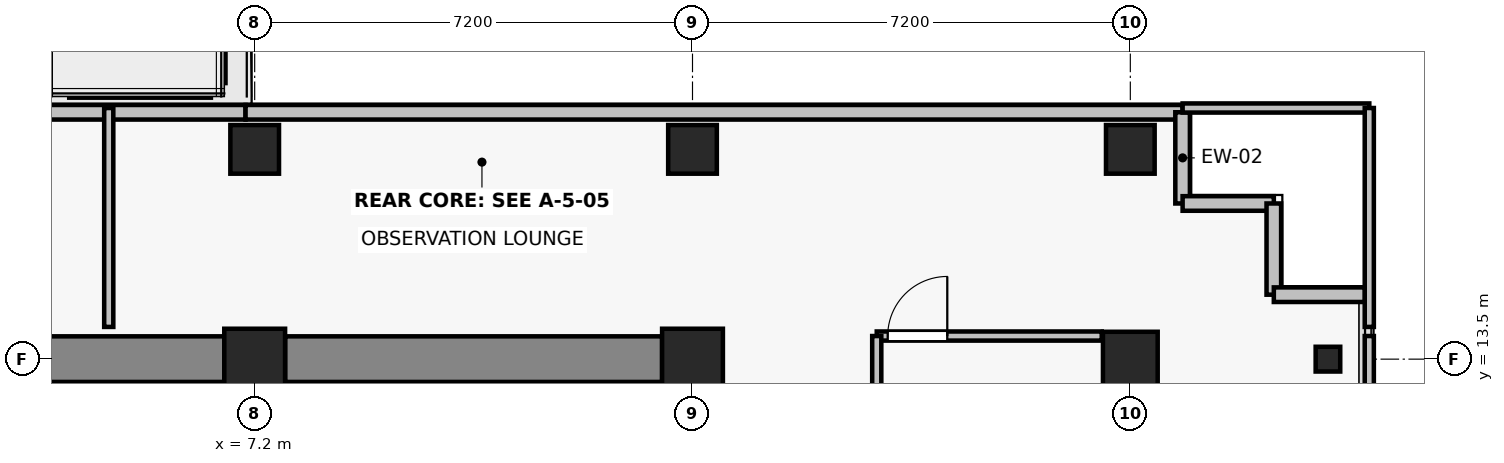
"""IFC4 building model, lengths in metres.
Left out: names, types, materials, properties, quantities, classifications, styles, units other than length and angle.
Written with IfcOpenShell. Run it as: python <this file> out.ifc"""

import sys

from ifc_helpers import new_model, si_unit, direction, frame, frame_2d, origin, origin_2d, place, context, subcontext, project, spatial, rectangle, i_section, extrude, source, transform, mapped, element, fill, save


model = new_model("IFC4")
c1 = context("Model", 3, precision=1e-05, world=origin(), true_north=direction((0.0, 1.0)))
c2 = subcontext(c1, "Body", "Model", "MODEL_VIEW")
j1 = project(units=[si_unit("LENGTHUNIT", "METRE"), si_unit("PLANEANGLEUNIT", "RADIAN")], contexts=[c1])
p1 = place(None, origin())
s1 = spatial("IfcSite", under=j1, at=p1, CompositionType="ELEMENT")
p2 = place(p1, origin())
s2 = spatial("IfcBuilding", under=s1, at=p2, CompositionType="ELEMENT")
p3 = place(p2, frame((0.0, 0.0, 86.8)))
s3 = spatial("IfcBuildingStorey", under=s2, at=p3, CompositionType="ELEMENT", Elevation=86.8)
for number, where, z_axis, x_axis in (
    (1, (7.2, 13.5, 0.0), (0.0, 0.0, 1.0), (1.0, 0.0, 0.0)),
    (2, (14.4, 13.5, 0.0), (0.0, 0.0, 1.0), (1.0, 0.0, 0.0)),
):
    element("IfcColumn", number, at=place(p3, frame(where, z_axis=z_axis, x_axis=x_axis)), inside=s3, PredefinedType="COLUMN", context=c2, shape_type="SweptSolid", body=[
        extrude(rectangle(XDim=1.0, YDim=1.0, at=origin_2d()), origin(), (0.0, 0.0, 1.0), 3.3),
    ])
p4 = place(p3, frame((21.6, 13.5, 0.0), z_axis=(0.0, 0.0, 1.0), x_axis=(1.0, 0.0, 0.0)))
e3 = element("IfcColumn", 3, at=p4, inside=s3, PredefinedType="COLUMN", context=c2, shape_type="SweptSolid", body=[
    extrude(rectangle(XDim=0.9, YDim=0.9, at=origin_2d()), origin(), (0.0, 0.0, 1.0), 3.3),
])
for number, where, z_axis, x_axis in (
    (4, (7.2, 16.95, 0.0), (0.0, 0.0, 1.0), (1.0, 0.0, 0.0)),
    (5, (14.4, 16.95, 0.0), (0.0, 0.0, 1.0), (1.0, 0.0, 0.0)),
    (6, (21.6, 16.95, 0.0), (0.0, 0.0, 1.0), (1.0, 0.0, 0.0)),
):
    element("IfcColumn", number, at=place(p3, frame(where, z_axis=z_axis, x_axis=x_axis)), inside=s3, PredefinedType="COLUMN", context=c2, shape_type="SweptSolid", body=[
        extrude(rectangle(XDim=0.8, YDim=0.8, at=origin_2d()), origin(), (0.0, 0.0, 1.0), 3.3),
    ])
p5 = place(p3, frame((24.85, 13.5, 0.0), z_axis=(0.0, 0.0, 1.0), x_axis=(1.0, 0.0, 0.0)))
e7 = element("IfcColumn", 7, at=p5, inside=s3, PredefinedType="COLUMN", context=c2, shape_type="SweptSolid", body=[
    extrude(i_section(OverallWidth=0.404, OverallDepth=0.407, WebThickness=0.022, FlangeThickness=0.032, FilletRadius=0.015, at=origin_2d()), origin(), (0.0, 0.0, 1.0), 3.3),
])
p6 = place(p3, frame((-6.7, 13.5, 0.0), z_axis=(0.0, 0.0, 1.0), x_axis=(1.0, 0.0, 0.0)))
e8 = element("IfcWall", 8, at=p6, inside=s3, PredefinedType="SHEAR", context=c2, shape_type="SweptSolid", body=[
    extrude(rectangle(XDim=13.4, YDim=0.75, at=frame_2d((6.7, 0.0))), origin(), (0.0, 0.0, 1.0), 3.075),
])
p7 = place(p3, frame((7.7, 13.5, 0.0), z_axis=(0.0, 0.0, 1.0), x_axis=(1.0, 0.0, 0.0)))
e9 = element("IfcWall", 9, at=p7, inside=s3, PredefinedType="SHEAR", context=c2, shape_type="SweptSolid", body=[
    extrude(rectangle(XDim=6.2, YDim=0.75, at=frame_2d((3.1, 0.0))), origin(), (0.0, 0.0, 1.0), 3.075),
])
p8 = place(p3, frame((-4.35, 17.56, 0.0), z_axis=(0.0, 0.0, 1.0), x_axis=(1.0, 0.0, 0.0)))
e10 = element("IfcWall", 10, at=p8, inside=s3, PredefinedType="SOLIDWALL", context=c2, shape_type="SweptSolid", body=[
    extrude(rectangle(XDim=11.4, YDim=0.24, at=frame_2d((5.7, 0.0))), origin(), (0.0, 0.0, 1.0), 2.59),
])
p9 = place(p8, frame((0.25, 0.0, 0.0)))
e11 = element("IfcOpeningElement", 11, at=p9, cuts=e10, PredefinedType="OPENING", context=c2, shape_type="SweptSolid", body=[
    extrude(rectangle(XDim=1.5, YDim=2.2, at=frame_2d((0.75, 1.1))), frame((0.0, 0.13, 0.0), z_axis=(0.0, -1.0, 0.0), x_axis=(1.0, 0.0, 0.0)), (0.0, 0.0, 1.0), 0.26),
])
p10 = place(p8, frame((5.4, 0.0, 0.85)))
e12 = element("IfcOpeningElement", 12, at=p10, cuts=e10, PredefinedType="OPENING", context=c2, shape_type="SweptSolid", body=[
    extrude(rectangle(XDim=1.8, YDim=1.6, at=frame_2d((0.9, 0.8))), frame((0.0, 0.13, 0.0), z_axis=(0.0, -1.0, 0.0), x_axis=(1.0, 0.0, 0.0)), (0.0, 0.0, 1.0), 0.26),
])
p11 = place(p3, frame((22.46, 17.56, 0.0), z_axis=(0.0, 0.0, 1.0), x_axis=(-1.0, 0.0, 0.0)))
e13 = element("IfcWall", 13, at=p11, inside=s3, PredefinedType="SOLIDWALL", context=c2, shape_type="SweptSolid", body=[
    extrude(rectangle(XDim=15.41, YDim=0.24, at=frame_2d((7.705, 0.0))), origin(), (0.0, 0.0, 1.0), 2.59),
])
p12 = place(p3, frame((22.46, 16.06, 0.0), z_axis=(0.0, 0.0, 1.0), x_axis=(0.0, 1.0, 0.0)))
e14 = element("IfcWall", 14, at=p12, inside=s3, PredefinedType="SOLIDWALL", context=c2, shape_type="SweptSolid", body=[
    extrude(rectangle(XDim=1.5, YDim=0.24, at=frame_2d((0.75, 0.0))), origin(), (0.0, 0.0, 1.0), 2.565),
])
for number, where, z_axis, x_axis in (
    (15, (23.96, 16.06, 0.0), (0.0, 0.0, 1.0), (-1.0, 0.0, 0.0)),
    (16, (23.96, 14.56, 0.0), (0.0, 0.0, 1.0), (0.0, 1.0, 0.0)),
    (17, (25.46, 14.56, 0.0), (0.0, 0.0, 1.0), (-1.0, 0.0, 0.0)),
):
    element("IfcWall", number, at=place(p3, frame(where, z_axis=z_axis, x_axis=x_axis)), inside=s3, PredefinedType="SOLIDWALL", context=c2, shape_type="SweptSolid", body=[
        extrude(rectangle(XDim=1.5, YDim=0.24, at=frame_2d((0.75, 0.0))), origin(), (0.0, 0.0, 1.0), 3.075),
    ])
p13 = place(p3, frame((6.62, 18.04, -0.25), z_axis=(0.0, 0.0, 1.0), x_axis=(0.0, 1.0, 0.0)))
e18 = element("IfcWall", 18, at=p13, inside=s3, PredefinedType="SOLIDWALL", context=c2, shape_type="SweptSolid", body=[
    extrude(rectangle(XDim=2.18, YDim=0.2, at=frame_2d((1.09, 0.0))), origin(), (0.0, 0.0, 1.0), 1.7),
])
p14 = place(p3, frame((4.15, 17.9, -0.25), z_axis=(0.0, 0.0, 1.0), x_axis=(1.0, 0.0, 0.0)))
e19 = element("IfcWall", 19, at=p14, inside=s3, PredefinedType="SOLIDWALL", context=c2, shape_type="SweptSolid", body=[
    extrude(rectangle(XDim=2.33, YDim=0.2, at=frame_2d((1.165, 0.0))), origin(), (0.0, 0.0, 1.0), 1.7),
])
p15 = place(p3, frame((17.43, 13.88, 0.0), z_axis=(0.0, 0.0, 1.0), x_axis=(1.0, 0.0, 0.0)))
e20 = element("IfcWall", 20, at=p15, inside=s3, PredefinedType="PARTITIONING", context=c2, shape_type="SweptSolid", body=[
    extrude(rectangle(XDim=3.7, YDim=0.15, at=frame_2d((1.85, 0.0))), origin(), (0.0, 0.0, 1.0), 3.075),
])
p16 = place(p15, frame((0.18, 0.0, 0.0)))
e21 = element("IfcOpeningElement", 21, at=p16, cuts=e20, PredefinedType="OPENING", context=c2, shape_type="SweptSolid", body=[
    extrude(rectangle(XDim=0.98, YDim=2.15, at=frame_2d((0.49, 1.075))), frame((0.0, 0.085, 0.0), z_axis=(0.0, -1.0, 0.0), x_axis=(1.0, 0.0, 0.0)), (0.0, 0.0, 1.0), 0.17),
])
p17 = place(p3, frame((17.43, -1.77, 0.0), z_axis=(0.0, 0.0, 1.0), x_axis=(0.0, 1.0, 0.0)))
e22 = element("IfcWall", 22, at=p17, inside=s3, PredefinedType="PARTITIONING", context=c2, shape_type="SweptSolid", body=[
    extrude(rectangle(XDim=15.65, YDim=0.15, at=frame_2d((7.825, 0.0))), origin(), (0.0, 0.0, 1.0), 2.515),
])
p18 = place(p17, frame((7.335, 0.0, 0.0)))
e23 = element("IfcOpeningElement", 23, at=p18, cuts=e22, PredefinedType="OPENING", context=c2, shape_type="SweptSolid", body=[
    extrude(rectangle(XDim=0.98, YDim=2.15, at=frame_2d((0.49, 1.075))), frame((0.0, 0.085, 0.0), z_axis=(0.0, -1.0, 0.0), x_axis=(1.0, 0.0, 0.0)), (0.0, 0.0, 1.0), 0.17),
])
p19 = place(p3, frame((25.53, 13.88, 0.0), z_axis=(0.0, 0.0, 1.0), x_axis=(0.0, -1.0, 0.0)))
e24 = element("IfcWall", 24, at=p19, inside=s3, PredefinedType="PARTITIONING", context=c2, shape_type="SweptSolid", body=[
    extrude(rectangle(XDim=15.65, YDim=0.15, at=frame_2d((7.825, 0.0))), origin(), (0.0, 0.0, 1.0), 3.075),
])
p20 = place(p3, frame((4.8, 17.63, 0.0), z_axis=(0.0, 0.0, 1.0), x_axis=(0.0, -1.0, 0.0)))
e25 = element("IfcWall", 25, at=p20, inside=s3, PredefinedType="PARTITIONING", context=c2, shape_type="SweptSolid", body=[
    extrude(rectangle(XDim=3.6, YDim=0.15, at=frame_2d((1.8, 0.0))), origin(), (0.0, 0.0, 1.0), 2.565),
])
p21 = place(p3, frame((22.46, 17.63, 0.0), z_axis=(0.0, 0.0, 1.0), x_axis=(1.0, 0.0, 0.0)))
e26 = element("IfcWall", 26, at=p21, inside=s3, PredefinedType="PARTITIONING", context=c2, shape_type="SweptSolid", body=[
    extrude(rectangle(XDim=3.07, YDim=0.15, at=frame_2d((1.535, 0.0))), origin(), (0.0, 0.0, 1.0), 2.59),
])
p22 = place(p3, frame((25.53, 17.63, 0.0), z_axis=(0.0, 0.0, 1.0), x_axis=(0.0, -1.0, 0.0)))
e27 = element("IfcWall", 27, at=p22, inside=s3, PredefinedType="PARTITIONING", context=c2, shape_type="SweptSolid", body=[
    extrude(rectangle(XDim=3.6, YDim=0.15, at=frame_2d((1.8, 0.0))), origin(), (0.0, 0.0, 1.0), 3.075),
])
m1 = source(origin(), c2, "Body", "SweptSolid", [
    extrude(rectangle(XDim=0.98, YDim=2.15, at=frame_2d((0.49, 1.075))), frame((0.0, 0.025, 0.0), z_axis=(0.0, -1.0, 0.0), x_axis=(1.0, 0.0, 0.0)), (0.0, 0.0, 1.0), 0.05),
])
p23 = place(p16, origin())
e28 = element("IfcDoor", 28, at=p23, inside=s3, OperationType="SINGLE_SWING_RIGHT", PredefinedType="DOOR", context=c2, shape_type="MappedRepresentation", body=[
    mapped(m1, transform((0.0, 0.0, 0.0), x_axis=(1.0, 0.0, 0.0), y_axis=(0.0, 1.0, 0.0), z_axis=(0.0, 0.0, 1.0), scale=1.0)),
])
fill(e21, e28)
save(model, sys.argv[1])
